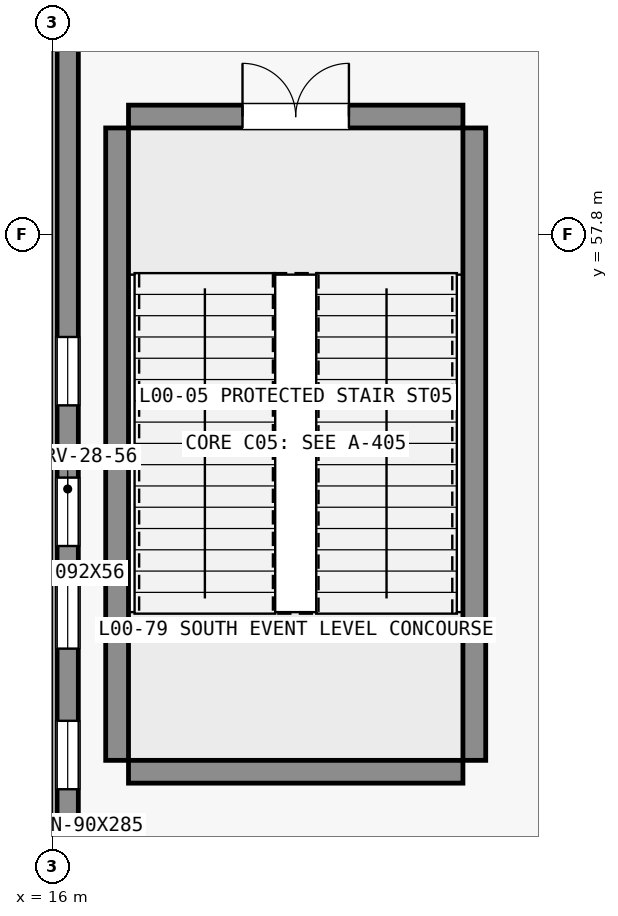
"""IFC4 building model, lengths in metres.
Left out: names, types, materials, properties, quantities, classifications, styles, units other than length and angle.
Written with IfcOpenShell. Run it as: python <this file> out.ifc"""

import sys

from ifc_helpers import new_model, si_unit, direction, frame, frame_2d, origin, place, context, subcontext, project, spatial, rectangle, extrude, element, fill, save


model = new_model("IFC4")
c1 = context("Model", 3, precision=1e-05, world=origin(), true_north=direction((0.0, 1.0)))
c2 = subcontext(c1, "Body", "Model", "MODEL_VIEW")
j1 = project(units=[si_unit("LENGTHUNIT", "METRE"), si_unit("PLANEANGLEUNIT", "RADIAN")], contexts=[c1])
p1 = place(None, origin())
s1 = spatial("IfcSite", under=j1, at=p1, CompositionType="ELEMENT")
p2 = place(p1, origin())
s2 = spatial("IfcBuilding", under=s1, at=p2, CompositionType="ELEMENT")
p3 = place(p2, origin())
s3 = spatial("IfcBuildingStorey", under=s2, at=p3, CompositionType="ELEMENT", Elevation=0.0)
p4 = place(p3, frame((17.0, 50.73, 0.0), z_axis=(0.0, 0.0, 1.0), x_axis=(1.0, 0.0, 0.0)))
e1 = element("IfcWall", 1, at=p4, inside=s3, PredefinedType="SHEAR", context=c2, shape_type="SweptSolid", body=[
    extrude(rectangle(XDim=4.4, YDim=0.3, at=frame_2d((2.2, 0.0))), origin(), (0.0, 0.0, 1.0), 6.0),
])
p5 = place(p3, frame((17.0, 59.35, 0.0), z_axis=(0.0, 0.0, 1.0), x_axis=(1.0, 0.0, 0.0)))
e2 = element("IfcWall", 2, at=p5, inside=s3, PredefinedType="SHEAR", context=c2, shape_type="SweptSolid", body=[
    extrude(rectangle(XDim=4.4, YDim=0.3, at=frame_2d((2.2, 0.0))), origin(), (0.0, 0.0, 1.0), 6.0),
])
p6 = place(p5, frame((1.5, 0.0, 0.0)))
e3 = element("IfcOpeningElement", 3, at=p6, cuts=e2, PredefinedType="OPENING", context=c2, shape_type="SweptSolid", body=[
    extrude(rectangle(XDim=1.4, YDim=2.2, at=frame_2d((0.7, 1.1))), frame((0.0, 0.16, 0.0), z_axis=(0.0, -1.0, 0.0), x_axis=(1.0, 0.0, 0.0)), (0.0, 0.0, 1.0), 0.32),
])
for number, where, z_axis, x_axis in (
    (4, (16.85, 50.88, 0.0), (0.0, 0.0, 1.0), (0.0, 1.0, 0.0)),
    (5, (21.55, 50.88, 0.0), (0.0, 0.0, 1.0), (0.0, 1.0, 0.0)),
):
    element("IfcWall", number, at=place(p3, frame(where, z_axis=z_axis, x_axis=x_axis)), inside=s3, PredefinedType="SHEAR", context=c2, shape_type="SweptSolid", body=[
        extrude(rectangle(XDim=8.32, YDim=0.3, at=frame_2d((4.16, 0.0))), origin(), (0.0, 0.0, 1.0), 6.0),
    ])
p7 = place(p3, frame((16.2, 48.05, 0.0), z_axis=(0.0, 0.0, 1.0), x_axis=(0.0, 1.0, 0.0)))
e6 = element("IfcWall", 6, at=p7, inside=s3, PredefinedType="STANDARD", context=c2, shape_type="SweptSolid", body=[
    extrude(rectangle(XDim=12.8, YDim=0.28, at=frame_2d((6.4, 0.0))), origin(), (0.0, 0.0, 1.0), 5.64),
])
p8 = place(p7, frame((1.1, 0.0, 0.95)))
e7 = element("IfcOpeningElement", 7, at=p8, cuts=e6, PredefinedType="OPENING", context=c2, shape_type="SweptSolid", body=[
    extrude(rectangle(XDim=0.9, YDim=2.85, at=frame_2d((0.45, 1.425))), frame((0.0, 0.15, 0.0), z_axis=(0.0, -1.0, 0.0), x_axis=(1.0, 0.0, 0.0)), (0.0, 0.0, 1.0), 0.3),
])
p9 = place(p7, frame((2.45, 0.0, 0.95)))
e8 = element("IfcOpeningElement", 8, at=p9, cuts=e6, PredefinedType="OPENING", context=c2, shape_type="SweptSolid", body=[
    extrude(rectangle(XDim=0.9, YDim=2.85, at=frame_2d((0.45, 1.425))), frame((0.0, 0.15, 0.0), z_axis=(0.0, -1.0, 0.0), x_axis=(1.0, 0.0, 0.0)), (0.0, 0.0, 1.0), 0.3),
])
p10 = place(p7, frame((4.3, 0.0, 0.95)))
e9 = element("IfcOpeningElement", 9, at=p10, cuts=e6, PredefinedType="OPENING", context=c2, shape_type="SweptSolid", body=[
    extrude(rectangle(XDim=0.9, YDim=2.85, at=frame_2d((0.45, 1.425))), frame((0.0, 0.15, 0.0), z_axis=(0.0, -1.0, 0.0), x_axis=(1.0, 0.0, 0.0)), (0.0, 0.0, 1.0), 0.3),
])
p11 = place(p7, frame((5.65, 0.0, 0.95)))
e10 = element("IfcOpeningElement", 10, at=p11, cuts=e6, PredefinedType="OPENING", context=c2, shape_type="SweptSolid", body=[
    extrude(rectangle(XDim=0.9, YDim=2.85, at=frame_2d((0.45, 1.425))), frame((0.0, 0.15, 0.0), z_axis=(0.0, -1.0, 0.0), x_axis=(1.0, 0.0, 0.0)), (0.0, 0.0, 1.0), 0.3),
])
p12 = place(p7, frame((7.5, 0.0, 0.95)))
e11 = element("IfcOpeningElement", 11, at=p12, cuts=e6, PredefinedType="OPENING", context=c2, shape_type="SweptSolid", body=[
    extrude(rectangle(XDim=0.9, YDim=2.85, at=frame_2d((0.45, 1.425))), frame((0.0, 0.15, 0.0), z_axis=(0.0, -1.0, 0.0), x_axis=(1.0, 0.0, 0.0)), (0.0, 0.0, 1.0), 0.3),
])
p13 = place(p8, origin())
e12 = element("IfcWindow", 12, at=p13, inside=s3, PartitioningType="DOUBLE_PANEL_VERTICAL", PredefinedType="WINDOW", context=c2, shape_type="SweptSolid", body=[
    extrude(rectangle(XDim=0.9, YDim=2.85, at=frame_2d((0.45, 1.425))), frame((0.0, 0.03, 0.0), z_axis=(0.0, -1.0, 0.0), x_axis=(1.0, 0.0, 0.0)), (0.0, 0.0, 1.0), 0.06),
])
fill(e7, e12)
p14 = place(p9, origin())
e13 = element("IfcWindow", 13, at=p14, inside=s3, PartitioningType="DOUBLE_PANEL_VERTICAL", PredefinedType="WINDOW", context=c2, shape_type="SweptSolid", body=[
    extrude(rectangle(XDim=0.9, YDim=2.85, at=frame_2d((0.45, 1.425))), frame((0.0, 0.03, 0.0), z_axis=(0.0, -1.0, 0.0), x_axis=(1.0, 0.0, 0.0)), (0.0, 0.0, 1.0), 0.06),
])
fill(e8, e13)
p15 = place(p10, origin())
e14 = element("IfcWindow", 14, at=p15, inside=s3, PartitioningType="DOUBLE_PANEL_VERTICAL", PredefinedType="WINDOW", context=c2, shape_type="SweptSolid", body=[
    extrude(rectangle(XDim=0.9, YDim=2.85, at=frame_2d((0.45, 1.425))), frame((0.0, 0.03, 0.0), z_axis=(0.0, -1.0, 0.0), x_axis=(1.0, 0.0, 0.0)), (0.0, 0.0, 1.0), 0.06),
])
fill(e9, e14)
p16 = place(p11, origin())
e15 = element("IfcWindow", 15, at=p16, inside=s3, PartitioningType="DOUBLE_PANEL_VERTICAL", PredefinedType="WINDOW", context=c2, shape_type="SweptSolid", body=[
    extrude(rectangle(XDim=0.9, YDim=2.85, at=frame_2d((0.45, 1.425))), frame((0.0, 0.03, 0.0), z_axis=(0.0, -1.0, 0.0), x_axis=(1.0, 0.0, 0.0)), (0.0, 0.0, 1.0), 0.06),
])
fill(e10, e15)
p17 = place(p12, origin())
e16 = element("IfcWindow", 16, at=p17, inside=s3, PartitioningType="DOUBLE_PANEL_VERTICAL", PredefinedType="WINDOW", context=c2, shape_type="SweptSolid", body=[
    extrude(rectangle(XDim=0.9, YDim=2.85, at=frame_2d((0.45, 1.425))), frame((0.0, 0.03, 0.0), z_axis=(0.0, -1.0, 0.0), x_axis=(1.0, 0.0, 0.0)), (0.0, 0.0, 1.0), 0.06),
])
fill(e11, e16)
p18 = place(p6, origin())
e17 = element("IfcDoor", 17, at=p18, inside=s3, OperationType="DOUBLE_DOOR_SINGLE_SWING", PredefinedType="DOOR", context=c2, shape_type="SweptSolid", body=[
    extrude(rectangle(XDim=1.4, YDim=2.2, at=frame_2d((0.7, 1.1))), frame((0.0, 0.025, 0.0), z_axis=(0.0, -1.0, 0.0), x_axis=(1.0, 0.0, 0.0)), (0.0, 0.0, 1.0), 0.05),
])
fill(e3, e17)
save(model, sys.argv[1])
